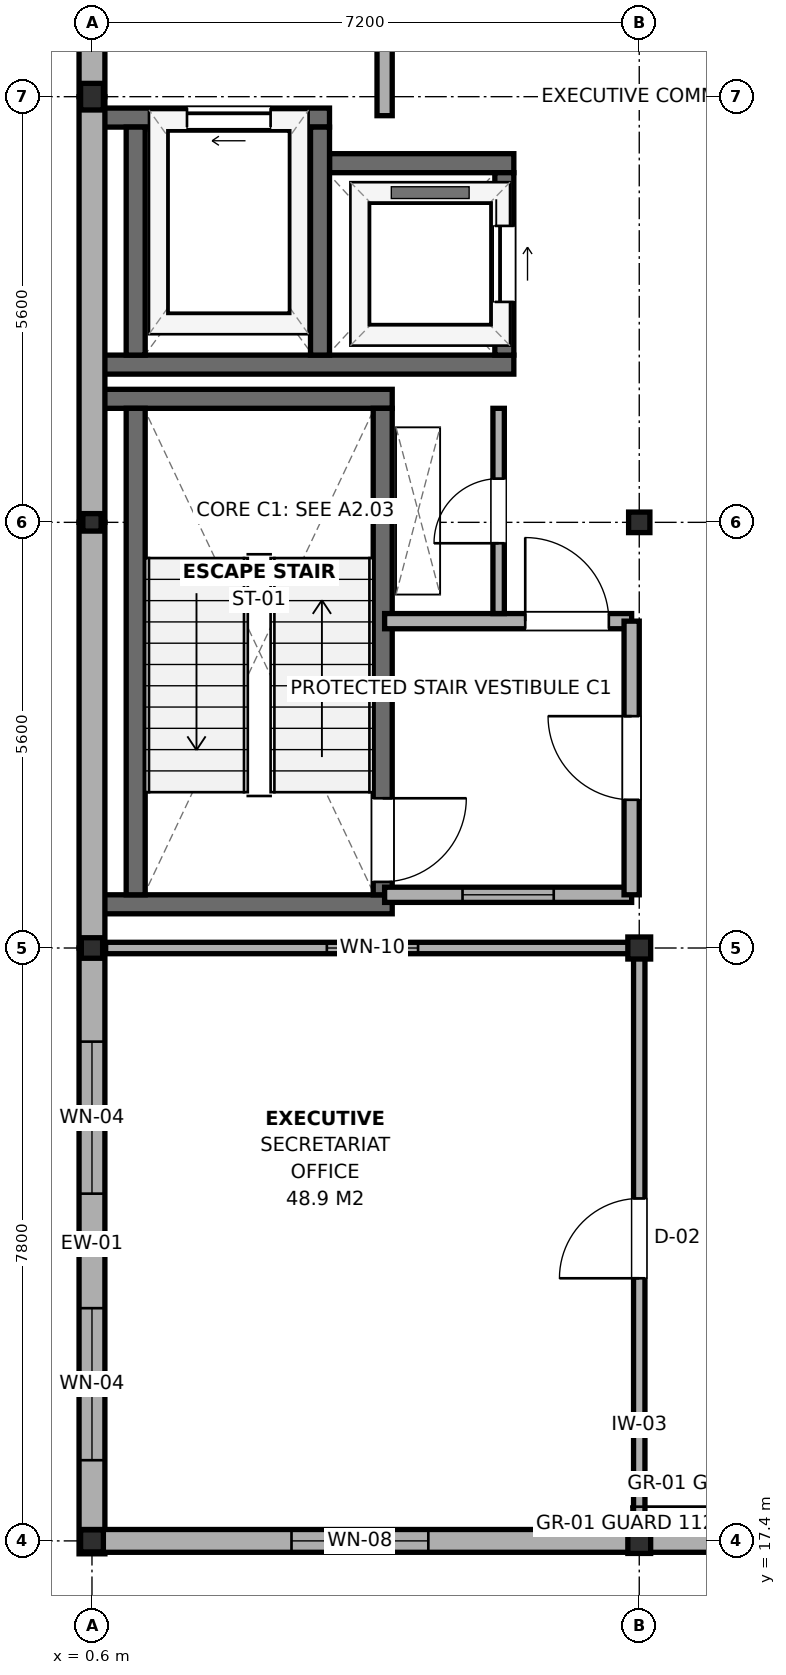
"""IFC4 building model, lengths in metres.
Left out: names, types, materials, properties, quantities, classifications, styles, units other than length and angle.
Written with IfcOpenShell. Run it as: python <this file> out.ifc"""

import sys

from ifc_helpers import new_model, si_unit, direction, frame, frame_2d, origin, origin_2d, place, context, subcontext, project, spatial, rectangle, i_section, extrude, element, fill, save


model = new_model("IFC4")
c1 = context("Model", 3, precision=1e-05, world=origin(), true_north=direction((0.0, 1.0)))
c2 = subcontext(c1, "Body", "Model", "MODEL_VIEW")
j1 = project(units=[si_unit("LENGTHUNIT", "METRE"), si_unit("PLANEANGLEUNIT", "RADIAN")], contexts=[c1])
p1 = place(None, origin())
s1 = spatial("IfcSite", under=j1, at=p1, CompositionType="ELEMENT")
p2 = place(p1, origin())
s2 = spatial("IfcBuilding", under=s1, at=p2, CompositionType="ELEMENT")
p3 = place(p2, frame((0.0, 0.0, 32.7)))
s3 = spatial("IfcBuildingStorey", under=s2, at=p3, CompositionType="ELEMENT", Elevation=32.7)
p4 = place(p3, frame((0.6, 17.4, 0.0), z_axis=(0.0, 0.0, 1.0), x_axis=(1.0, 0.0, 0.0)))
e1 = element("IfcColumn", 1, at=p4, inside=s3, PredefinedType="COLUMN", context=c2, shape_type="SweptSolid", body=[
    extrude(i_section(OverallWidth=0.3, OverallDepth=0.29, WebThickness=0.009, FlangeThickness=0.014, FilletRadius=0.027, at=origin_2d()), origin(), (0.0, 0.0, 1.0), 3.72),
])
p5 = place(p3, frame((0.6, 25.2, 0.0), z_axis=(0.0, 0.0, 1.0), x_axis=(1.0, 0.0, 0.0)))
e2 = element("IfcColumn", 2, at=p5, inside=s3, PredefinedType="COLUMN", context=c2, shape_type="SweptSolid", body=[
    extrude(i_section(OverallWidth=0.28, OverallDepth=0.27, WebThickness=0.008, FlangeThickness=0.013, FilletRadius=0.024, at=origin_2d()), origin(), (0.0, 0.0, 1.0), 3.72),
])
p6 = place(p3, frame((0.6, 30.8, 0.0), z_axis=(0.0, 0.0, 1.0), x_axis=(1.0, 0.0, 0.0)))
e3 = element("IfcColumn", 3, at=p6, inside=s3, PredefinedType="COLUMN", context=c2, shape_type="SweptSolid", body=[
    extrude(i_section(OverallWidth=0.24, OverallDepth=0.23, WebThickness=0.008, FlangeThickness=0.012, FilletRadius=0.021, at=origin_2d()), origin(), (0.0, 0.0, 1.0), 3.72),
])
p7 = place(p3, frame((0.6, 36.4, 0.0), z_axis=(0.0, 0.0, 1.0), x_axis=(1.0, 0.0, 0.0)))
e4 = element("IfcColumn", 4, at=p7, inside=s3, PredefinedType="COLUMN", context=c2, shape_type="SweptSolid", body=[
    extrude(i_section(OverallWidth=0.3, OverallDepth=0.35, WebThickness=0.01, FlangeThickness=0.018, FilletRadius=0.027, at=origin_2d()), origin(), (0.0, 0.0, 1.0), 3.72),
])
p8 = place(p3, frame((7.8, 17.4, 0.0), z_axis=(0.0, 0.0, 1.0), x_axis=(1.0, 0.0, 0.0)))
e5 = element("IfcColumn", 5, at=p8, inside=s3, PredefinedType="COLUMN", context=c2, shape_type="SweptSolid", body=[
    extrude(i_section(OverallWidth=0.3, OverallDepth=0.33, WebThickness=0.01, FlangeThickness=0.017, FilletRadius=0.027, at=origin_2d()), origin(), (0.0, 0.0, 1.0), 3.72),
])
p9 = place(p3, frame((7.8, 25.2, 0.0), z_axis=(0.0, 0.0, 1.0), x_axis=(1.0, 0.0, 0.0)))
e6 = element("IfcColumn", 6, at=p9, inside=s3, PredefinedType="COLUMN", context=c2, shape_type="SweptSolid", body=[
    extrude(i_section(OverallWidth=0.3, OverallDepth=0.29, WebThickness=0.009, FlangeThickness=0.014, FilletRadius=0.027, at=origin_2d()), origin(), (0.0, 0.0, 1.0), 3.72),
])
p10 = place(p3, frame((7.8, 30.8, 0.0), z_axis=(0.0, 0.0, 1.0), x_axis=(1.0, 0.0, 0.0)))
e7 = element("IfcColumn", 7, at=p10, inside=s3, PredefinedType="COLUMN", context=c2, shape_type="SweptSolid", body=[
    extrude(i_section(OverallWidth=0.28, OverallDepth=0.27, WebThickness=0.008, FlangeThickness=0.013, FilletRadius=0.024, at=origin_2d()), origin(), (0.0, 0.0, 1.0), 3.72),
])
p11 = place(p3, frame((7.8, 36.4, 0.0), z_axis=(0.0, 0.0, 1.0), x_axis=(1.0, 0.0, 0.0)))
e8 = element("IfcColumn", 8, at=p11, inside=s3, PredefinedType="COLUMN", context=c2, shape_type="SweptSolid", body=[
    extrude(i_section(OverallWidth=0.24, OverallDepth=0.23, WebThickness=0.008, FlangeThickness=0.012, FilletRadius=0.021, at=origin_2d()), origin(), (0.0, 0.0, 1.0), 3.72),
])
for number, where, z_axis, x_axis in (
    (9, (0.75, 25.775, 0.0), (0.0, 0.0, 1.0), (1.0, 0.0, 0.0)),
    (10, (0.75, 32.425, 0.0), (0.0, 0.0, 1.0), (1.0, 0.0, 0.0)),
):
    element("IfcWall", number, at=place(p3, frame(where, z_axis=z_axis, x_axis=x_axis)), inside=s3, PredefinedType="SHEAR", context=c2, shape_type="SweptSolid", body=[
        extrude(rectangle(XDim=3.8, YDim=0.25, at=frame_2d((1.9, 0.0))), origin(), (0.0, 0.0, 1.0), 3.9),
    ])
p12 = place(p3, frame((1.175, 25.9, 0.0), z_axis=(0.0, 0.0, 1.0), x_axis=(0.0, 1.0, 0.0)))
e11 = element("IfcWall", 11, at=p12, inside=s3, PredefinedType="SHEAR", context=c2, shape_type="SweptSolid", body=[
    extrude(rectangle(XDim=6.4, YDim=0.25, at=frame_2d((3.2, 0.0))), origin(), (0.0, 0.0, 1.0), 3.9),
])
p13 = place(p3, frame((4.425, 25.9, 0.0), z_axis=(0.0, 0.0, 1.0), x_axis=(0.0, 1.0, 0.0)))
e12 = element("IfcWall", 12, at=p13, inside=s3, PredefinedType="SHEAR", context=c2, shape_type="SweptSolid", body=[
    extrude(rectangle(XDim=6.4, YDim=0.25, at=frame_2d((3.2, 0.0))), origin(), (0.0, 0.0, 1.0), 3.9),
])
p14 = place(p13, frame((0.17, 0.0, 0.0)))
e13 = element("IfcOpeningElement", 13, at=p14, cuts=e12, PredefinedType="OPENING", context=c2, shape_type="SweptSolid", body=[
    extrude(rectangle(XDim=1.1, YDim=2.15, at=frame_2d((0.55, 1.075))), frame((0.0, 0.14, 0.0), z_axis=(0.0, -1.0, 0.0), x_axis=(1.0, 0.0, 0.0)), (0.0, 0.0, 1.0), 0.28),
])
p15 = place(p3, frame((0.75, 32.875, 0.0), z_axis=(0.0, 0.0, 1.0), x_axis=(1.0, 0.0, 0.0)))
e14 = element("IfcWall", 14, at=p15, inside=s3, PredefinedType="SHEAR", context=c2, shape_type="SweptSolid", body=[
    extrude(rectangle(XDim=5.4, YDim=0.25, at=frame_2d((2.7, 0.0))), origin(), (0.0, 0.0, 1.0), 3.9),
])
p16 = place(p3, frame((0.75, 36.125, 0.0), z_axis=(0.0, 0.0, 1.0), x_axis=(1.0, 0.0, 0.0)))
e15 = element("IfcWall", 15, at=p16, inside=s3, PredefinedType="SHEAR", context=c2, shape_type="SweptSolid", body=[
    extrude(rectangle(XDim=2.975, YDim=0.25, at=frame_2d((1.488, 0.0))), origin(), (0.0, 0.0, 1.0), 3.9),
])
p17 = place(p16, frame((1.1, 0.0, 0.0)))
e16 = element("IfcOpeningElement", 16, at=p17, cuts=e15, PredefinedType="OPENING", context=c2, shape_type="SweptSolid", body=[
    extrude(rectangle(XDim=1.1, YDim=2.15, at=frame_2d((0.55, 1.075))), frame((0.0, 0.14, 0.0), z_axis=(0.0, -1.0, 0.0), x_axis=(1.0, 0.0, 0.0)), (0.0, 0.0, 1.0), 0.28),
])
p18 = place(p3, frame((3.725, 35.525, 0.0), z_axis=(0.0, 0.0, 1.0), x_axis=(1.0, 0.0, 0.0)))
e17 = element("IfcWall", 17, at=p18, inside=s3, PredefinedType="SHEAR", context=c2, shape_type="SweptSolid", body=[
    extrude(rectangle(XDim=2.425, YDim=0.25, at=frame_2d((1.212, 0.0))), origin(), (0.0, 0.0, 1.0), 3.9),
])
for number, where, z_axis, x_axis in (
    (18, (1.175, 33.0, 0.0), (0.0, 0.0, 1.0), (0.0, 1.0, 0.0)),
    (19, (3.6, 33.0, 0.0), (0.0, 0.0, 1.0), (0.0, 1.0, 0.0)),
):
    element("IfcWall", number, at=place(p3, frame(where, z_axis=z_axis, x_axis=x_axis)), inside=s3, PredefinedType="SHEAR", context=c2, shape_type="SweptSolid", body=[
        extrude(rectangle(XDim=3.0, YDim=0.25, at=frame_2d((1.5, 0.0))), origin(), (0.0, 0.0, 1.0), 3.9),
    ])
p19 = place(p3, frame((6.025, 33.0, 0.0), z_axis=(0.0, 0.0, 1.0), x_axis=(0.0, 1.0, 0.0)))
e20 = element("IfcWall", 20, at=p19, inside=s3, PredefinedType="SHEAR", context=c2, shape_type="SweptSolid", body=[
    extrude(rectangle(XDim=2.4, YDim=0.25, at=frame_2d((1.2, 0.0))), origin(), (0.0, 0.0, 1.0), 3.9),
])
p20 = place(p19, frame((0.7, 0.0, 0.0)))
e21 = element("IfcOpeningElement", 21, at=p20, cuts=e20, PredefinedType="OPENING", context=c2, shape_type="SweptSolid", body=[
    extrude(rectangle(XDim=1.0, YDim=2.15, at=frame_2d((0.5, 1.075))), frame((0.0, 0.14, 0.0), z_axis=(0.0, -1.0, 0.0), x_axis=(1.0, 0.0, 0.0)), (0.0, 0.0, 1.0), 0.28),
])
p21 = place(p3, frame((0.6, 17.23, 0.0), z_axis=(0.0, 0.0, 1.0), x_axis=(0.0, 1.0, 0.0)))
e22 = element("IfcWall", 22, at=p21, inside=s3, PredefinedType="SOLIDWALL", context=c2, shape_type="SweptSolid", body=[
    extrude(rectangle(XDim=7.97, YDim=0.34, at=frame_2d((3.985, 0.0))), origin(), (0.0, 0.0, 1.0), 3.365),
])
p22 = place(p21, frame((1.232, 0.0, 0.9)))
e23 = element("IfcOpeningElement", 23, at=p22, cuts=e22, PredefinedType="OPENING", context=c2, shape_type="SweptSolid", body=[
    extrude(rectangle(XDim=2.0, YDim=1.8, at=frame_2d((1.0, 0.9))), frame((0.0, 0.185, 0.0), z_axis=(0.0, -1.0, 0.0), x_axis=(1.0, 0.0, 0.0)), (0.0, 0.0, 1.0), 0.37),
])
p23 = place(p21, frame((4.738, 0.0, 0.9)))
e24 = element("IfcOpeningElement", 24, at=p23, cuts=e22, PredefinedType="OPENING", context=c2, shape_type="SweptSolid", body=[
    extrude(rectangle(XDim=2.0, YDim=1.8, at=frame_2d((1.0, 0.9))), frame((0.0, 0.185, 0.0), z_axis=(0.0, -1.0, 0.0), x_axis=(1.0, 0.0, 0.0)), (0.0, 0.0, 1.0), 0.37),
])
p24 = place(p3, frame((0.6, 25.2, 0.0), z_axis=(0.0, 0.0, 1.0), x_axis=(0.0, 1.0, 0.0)))
e25 = element("IfcWall", 25, at=p24, inside=s3, PredefinedType="SOLIDWALL", context=c2, shape_type="SweptSolid", body=[
    extrude(rectangle(XDim=5.6, YDim=0.34, at=frame_2d((2.8, 0.0))), origin(), (0.0, 0.0, 1.0), 3.115),
])
p25 = place(p3, frame((0.6, 30.8, 0.0), z_axis=(0.0, 0.0, 1.0), x_axis=(0.0, 1.0, 0.0)))
e26 = element("IfcWall", 26, at=p25, inside=s3, PredefinedType="SOLIDWALL", context=c2, shape_type="SweptSolid", body=[
    extrude(rectangle(XDim=5.6, YDim=0.34, at=frame_2d((2.8, 0.0))), origin(), (0.0, 0.0, 1.0), 3.115),
])
p26 = place(p3, frame((0.6, 36.4, 0.0), z_axis=(0.0, 0.0, 1.0), x_axis=(0.0, 1.0, 0.0)))
e27 = element("IfcWall", 27, at=p26, inside=s3, PredefinedType="SOLIDWALL", context=c2, shape_type="SweptSolid", body=[
    extrude(rectangle(XDim=5.6, YDim=0.34, at=frame_2d((2.8, 0.0))), origin(), (0.0, 0.0, 1.0), 3.115),
])
p27 = place(p26, frame((0.85, 0.0, 0.9)))
e28 = element("IfcOpeningElement", 28, at=p27, cuts=e27, PredefinedType="OPENING", context=c2, shape_type="SweptSolid", body=[
    extrude(rectangle(XDim=2.0, YDim=1.8, at=frame_2d((1.0, 0.9))), frame((0.0, 0.185, 0.0), z_axis=(0.0, -1.0, 0.0), x_axis=(1.0, 0.0, 0.0)), (0.0, 0.0, 1.0), 0.37),
])
p28 = place(p3, frame((0.45, 17.4, 0.0), z_axis=(0.0, 0.0, 1.0), x_axis=(1.0, 0.0, 0.0)))
e29 = element("IfcWall", 29, at=p28, inside=s3, PredefinedType="SOLIDWALL", context=c2, shape_type="SweptSolid", body=[
    extrude(rectangle(XDim=7.35, YDim=0.3, at=frame_2d((3.675, 0.0))), origin(), (0.0, 0.0, 1.0), 3.165),
])
p29 = place(p28, frame((2.775, 0.0, 0.65)))
e30 = element("IfcOpeningElement", 30, at=p29, cuts=e29, PredefinedType="OPENING", context=c2, shape_type="SweptSolid", body=[
    extrude(rectangle(XDim=1.8, YDim=1.2, at=frame_2d((0.9, 0.6))), frame((0.0, 0.165, 0.0), z_axis=(0.0, -1.0, 0.0), x_axis=(1.0, 0.0, 0.0)), (0.0, 0.0, 1.0), 0.33),
])
p30 = place(p3, frame((7.8, 17.4, 0.0), z_axis=(0.0, 0.0, 1.0), x_axis=(1.0, 0.0, 0.0)))
e31 = element("IfcWall", 31, at=p30, inside=s3, PredefinedType="SOLIDWALL", context=c2, shape_type="SweptSolid", body=[
    extrude(rectangle(XDim=7.35, YDim=0.3, at=frame_2d((3.675, 0.0))), origin(), (0.0, 0.0, 1.0), 3.165),
])
p31 = place(p30, frame((2.775, 0.0, 0.65)))
e32 = element("IfcOpeningElement", 32, at=p31, cuts=e31, PredefinedType="OPENING", context=c2, shape_type="SweptSolid", body=[
    extrude(rectangle(XDim=1.8, YDim=1.2, at=frame_2d((0.9, 0.6))), frame((0.0, 0.165, 0.0), z_axis=(0.0, -1.0, 0.0), x_axis=(1.0, 0.0, 0.0)), (0.0, 0.0, 1.0), 0.33),
])
p32 = place(p3, frame((4.45, 36.15, 0.0), z_axis=(0.0, 0.0, 1.0), x_axis=(0.0, 1.0, 0.0)))
e33 = element("IfcWall", 33, at=p32, inside=s3, PredefinedType="PARTITIONING", context=c2, shape_type="SweptSolid", body=[
    extrude(rectangle(XDim=3.4, YDim=0.2, at=frame_2d((1.7, 0.0))), origin(), (0.0, 0.0, 1.0), 3.115),
])
p33 = place(p32, frame((1.15, 0.0, 0.0)))
e34 = element("IfcOpeningElement", 34, at=p33, cuts=e33, PredefinedType="OPENING", context=c2, shape_type="SweptSolid", body=[
    extrude(rectangle(XDim=1.1, YDim=2.15, at=frame_2d((0.55, 1.075))), frame((0.0, 0.115, 0.0), z_axis=(0.0, -1.0, 0.0), x_axis=(1.0, 0.0, 0.0)), (0.0, 0.0, 1.0), 0.23),
])
p34 = place(p3, frame((4.45, 25.9, 0.0), z_axis=(0.0, 0.0, 1.0), x_axis=(1.0, 0.0, 0.0)))
e35 = element("IfcWall", 35, at=p34, inside=s3, PredefinedType="PARTITIONING", context=c2, shape_type="SweptSolid", body=[
    extrude(rectangle(XDim=3.25, YDim=0.2, at=frame_2d((1.625, 0.0))), origin(), (0.0, 0.0, 1.0), 3.115),
])
p35 = place(p34, frame((1.025, 0.0, 0.95)))
e36 = element("IfcOpeningElement", 36, at=p35, cuts=e35, PredefinedType="OPENING", context=c2, shape_type="SweptSolid", body=[
    extrude(rectangle(XDim=1.2, YDim=1.5, at=frame_2d((0.6, 0.75))), frame((0.0, 0.115, 0.0), z_axis=(0.0, -1.0, 0.0), x_axis=(1.0, 0.0, 0.0)), (0.0, 0.0, 1.0), 0.23),
])
p36 = place(p3, frame((4.45, 29.5, 0.0), z_axis=(0.0, 0.0, 1.0), x_axis=(1.0, 0.0, 0.0)))
e37 = element("IfcWall", 37, at=p36, inside=s3, PredefinedType="PARTITIONING", context=c2, shape_type="SweptSolid", body=[
    extrude(rectangle(XDim=3.25, YDim=0.2, at=frame_2d((1.625, 0.0))), origin(), (0.0, 0.0, 1.0), 3.115),
])
p37 = place(p36, frame((1.85, 0.0, 0.0)))
e38 = element("IfcOpeningElement", 38, at=p37, cuts=e37, PredefinedType="OPENING", context=c2, shape_type="SweptSolid", body=[
    extrude(rectangle(XDim=1.1, YDim=2.15, at=frame_2d((0.55, 1.075))), frame((0.0, 0.115, 0.0), z_axis=(0.0, -1.0, 0.0), x_axis=(1.0, 0.0, 0.0)), (0.0, 0.0, 1.0), 0.23),
])
p38 = place(p3, frame((7.7, 25.9, 0.0), z_axis=(0.0, 0.0, 1.0), x_axis=(0.0, 1.0, 0.0)))
e39 = element("IfcWall", 39, at=p38, inside=s3, PredefinedType="PARTITIONING", context=c2, shape_type="SweptSolid", body=[
    extrude(rectangle(XDim=3.6, YDim=0.2, at=frame_2d((1.8, 0.0))), origin(), (0.0, 0.0, 1.0), 3.115),
])
p39 = place(p38, frame((1.25, 0.0, 0.0)))
e40 = element("IfcOpeningElement", 40, at=p39, cuts=e39, PredefinedType="OPENING", context=c2, shape_type="SweptSolid", body=[
    extrude(rectangle(XDim=1.1, YDim=2.15, at=frame_2d((0.55, 1.075))), frame((0.0, 0.115, 0.0), z_axis=(0.0, -1.0, 0.0), x_axis=(1.0, 0.0, 0.0)), (0.0, 0.0, 1.0), 0.23),
])
p40 = place(p3, frame((5.95, 29.6, 0.0), z_axis=(0.0, 0.0, 1.0), x_axis=(0.0, 1.0, 0.0)))
e41 = element("IfcWall", 41, at=p40, inside=s3, PredefinedType="PARTITIONING", context=c2, shape_type="SweptSolid", body=[
    extrude(rectangle(XDim=2.7, YDim=0.15, at=frame_2d((1.35, 0.0))), origin(), (0.0, 0.0, 1.0), 3.715),
])
p41 = place(p40, frame((0.925, 0.0, 0.0)))
e42 = element("IfcOpeningElement", 42, at=p41, cuts=e41, PredefinedType="OPENING", context=c2, shape_type="SweptSolid", body=[
    extrude(rectangle(XDim=0.85, YDim=2.1, at=frame_2d((0.425, 1.05))), frame((0.0, 0.09, 0.0), z_axis=(0.0, -1.0, 0.0), x_axis=(1.0, 0.0, 0.0)), (0.0, 0.0, 1.0), 0.18),
])
p42 = place(p3, frame((7.8, 17.56, 0.0), z_axis=(0.0, 0.0, 1.0), x_axis=(0.0, 1.0, 0.0)))
e43 = element("IfcWall", 43, at=p42, inside=s3, PredefinedType="PARTITIONING", context=c2, shape_type="SweptSolid", body=[
    extrude(rectangle(XDim=7.64, YDim=0.15, at=frame_2d((3.82, 0.0))), origin(), (0.0, 0.0, 1.0), 3.115),
])
p43 = place(p42, frame((3.295, 0.0, 0.0)))
e44 = element("IfcOpeningElement", 44, at=p43, cuts=e43, PredefinedType="OPENING", context=c2, shape_type="SweptSolid", body=[
    extrude(rectangle(XDim=1.05, YDim=2.15, at=frame_2d((0.525, 1.075))), frame((0.0, 0.09, 0.0), z_axis=(0.0, -1.0, 0.0), x_axis=(1.0, 0.0, 0.0)), (0.0, 0.0, 1.0), 0.18),
])
p44 = place(p3, frame((0.78, 25.2, 0.0), z_axis=(0.0, 0.0, 1.0), x_axis=(1.0, 0.0, 0.0)))
e45 = element("IfcWall", 45, at=p44, inside=s3, PredefinedType="PARTITIONING", context=c2, shape_type="SweptSolid", body=[
    extrude(rectangle(XDim=7.02, YDim=0.15, at=frame_2d((3.51, 0.0))), origin(), (0.0, 0.0, 1.0), 3.115),
])
p45 = place(p44, frame((2.91, 0.0, 0.95)))
e46 = element("IfcOpeningElement", 46, at=p45, cuts=e45, PredefinedType="OPENING", context=c2, shape_type="SweptSolid", body=[
    extrude(rectangle(XDim=1.2, YDim=1.5, at=frame_2d((0.6, 0.75))), frame((0.0, 0.09, 0.0), z_axis=(0.0, -1.0, 0.0), x_axis=(1.0, 0.0, 0.0)), (0.0, 0.0, 1.0), 0.18),
])
p46 = place(p22, origin())
e47 = element("IfcWindow", 47, at=p46, inside=s3, PartitioningType="SINGLE_PANEL", PredefinedType="WINDOW", context=c2, shape_type="SweptSolid", body=[
    extrude(rectangle(XDim=2.0, YDim=1.8, at=frame_2d((1.0, 0.9))), frame((0.0, 0.03, 0.0), z_axis=(0.0, -1.0, 0.0), x_axis=(1.0, 0.0, 0.0)), (0.0, 0.0, 1.0), 0.06),
])
fill(e23, e47)
p47 = place(p23, origin())
e48 = element("IfcWindow", 48, at=p47, inside=s3, PartitioningType="SINGLE_PANEL", PredefinedType="WINDOW", context=c2, shape_type="SweptSolid", body=[
    extrude(rectangle(XDim=2.0, YDim=1.8, at=frame_2d((1.0, 0.9))), frame((0.0, 0.03, 0.0), z_axis=(0.0, -1.0, 0.0), x_axis=(1.0, 0.0, 0.0)), (0.0, 0.0, 1.0), 0.06),
])
fill(e24, e48)
p48 = place(p29, origin())
e49 = element("IfcWindow", 49, at=p48, inside=s3, PartitioningType="SINGLE_PANEL", PredefinedType="WINDOW", context=c2, shape_type="SweptSolid", body=[
    extrude(rectangle(XDim=1.8, YDim=1.2, at=frame_2d((0.9, 0.6))), frame((0.0, 0.03, 0.0), z_axis=(0.0, -1.0, 0.0), x_axis=(1.0, 0.0, 0.0)), (0.0, 0.0, 1.0), 0.06),
])
fill(e30, e49)
p49 = place(p14, frame((1.1, 0.0, 0.0), z_axis=(0.0, 0.0, 1.0), x_axis=(-1.0, 0.0, 0.0)))
e50 = element("IfcDoor", 50, at=p49, inside=s3, OperationType="SINGLE_SWING_LEFT", PredefinedType="DOOR", context=c2, shape_type="SweptSolid", body=[
    extrude(rectangle(XDim=1.1, YDim=2.15, at=frame_2d((0.55, 1.075))), frame((0.0, 0.025, 0.0), z_axis=(0.0, -1.0, 0.0), x_axis=(1.0, 0.0, 0.0)), (0.0, 0.0, 1.0), 0.05),
])
fill(e13, e50)
p50 = place(p17, origin())
e51 = element("IfcDoor", 51, at=p50, inside=s3, OperationType="SLIDING_TO_LEFT", PredefinedType="DOOR", context=c2, shape_type="SweptSolid", body=[
    extrude(rectangle(XDim=1.1, YDim=2.15, at=frame_2d((0.55, 1.075))), frame((0.0, 0.025, 0.0), z_axis=(0.0, -1.0, 0.0), x_axis=(1.0, 0.0, 0.0)), (0.0, 0.0, 1.0), 0.05),
])
fill(e16, e51)
p51 = place(p20, frame((1.0, 0.0, 0.0), z_axis=(0.0, 0.0, 1.0), x_axis=(-1.0, 0.0, 0.0)))
e52 = element("IfcDoor", 52, at=p51, inside=s3, OperationType="SLIDING_TO_RIGHT", PredefinedType="DOOR", context=c2, shape_type="SweptSolid", body=[
    extrude(rectangle(XDim=1.0, YDim=2.15, at=frame_2d((0.5, 1.075))), frame((0.0, 0.025, 0.0), z_axis=(0.0, -1.0, 0.0), x_axis=(1.0, 0.0, 0.0)), (0.0, 0.0, 1.0), 0.05),
])
fill(e21, e52)
p52 = place(p35, origin())
e53 = element("IfcWindow", 53, at=p52, inside=s3, PartitioningType="SINGLE_PANEL", PredefinedType="WINDOW", context=c2, shape_type="SweptSolid", body=[
    extrude(rectangle(XDim=1.2, YDim=1.5, at=frame_2d((0.6, 0.75))), frame((0.0, 0.03, 0.0), z_axis=(0.0, -1.0, 0.0), x_axis=(1.0, 0.0, 0.0)), (0.0, 0.0, 1.0), 0.06),
])
fill(e36, e53)
p53 = place(p37, origin())
e54 = element("IfcDoor", 54, at=p53, inside=s3, OperationType="SINGLE_SWING_LEFT", PredefinedType="DOOR", context=c2, shape_type="SweptSolid", body=[
    extrude(rectangle(XDim=1.1, YDim=2.15, at=frame_2d((0.55, 1.075))), frame((0.0, 0.025, 0.0), z_axis=(0.0, -1.0, 0.0), x_axis=(1.0, 0.0, 0.0)), (0.0, 0.0, 1.0), 0.05),
])
fill(e38, e54)
p54 = place(p39, origin())
e55 = element("IfcDoor", 55, at=p54, inside=s3, OperationType="SINGLE_SWING_RIGHT", PredefinedType="DOOR", context=c2, shape_type="SweptSolid", body=[
    extrude(rectangle(XDim=1.1, YDim=2.15, at=frame_2d((0.55, 1.075))), frame((0.0, 0.025, 0.0), z_axis=(0.0, -1.0, 0.0), x_axis=(1.0, 0.0, 0.0)), (0.0, 0.0, 1.0), 0.05),
])
fill(e40, e55)
p55 = place(p41, origin())
e56 = element("IfcDoor", 56, at=p55, inside=s3, OperationType="SINGLE_SWING_LEFT", PredefinedType="DOOR", context=c2, shape_type="SweptSolid", body=[
    extrude(rectangle(XDim=0.85, YDim=2.1, at=frame_2d((0.425, 1.05))), frame((0.0, 0.025, 0.0), z_axis=(0.0, -1.0, 0.0), x_axis=(1.0, 0.0, 0.0)), (0.0, 0.0, 1.0), 0.05),
])
fill(e42, e56)
p56 = place(p43, origin())
e57 = element("IfcDoor", 57, at=p56, inside=s3, OperationType="SINGLE_SWING_LEFT", PredefinedType="DOOR", context=c2, shape_type="SweptSolid", body=[
    extrude(rectangle(XDim=1.05, YDim=2.15, at=frame_2d((0.525, 1.075))), frame((0.0, 0.025, 0.0), z_axis=(0.0, -1.0, 0.0), x_axis=(1.0, 0.0, 0.0)), (0.0, 0.0, 1.0), 0.05),
])
fill(e44, e57)
p57 = place(p45, origin())
e58 = element("IfcWindow", 58, at=p57, inside=s3, PartitioningType="SINGLE_PANEL", PredefinedType="WINDOW", context=c2, shape_type="SweptSolid", body=[
    extrude(rectangle(XDim=1.2, YDim=1.5, at=frame_2d((0.6, 0.75))), frame((0.0, 0.03, 0.0), z_axis=(0.0, -1.0, 0.0), x_axis=(1.0, 0.0, 0.0)), (0.0, 0.0, 1.0), 0.06),
])
fill(e46, e58)
save(model, sys.argv[1])
